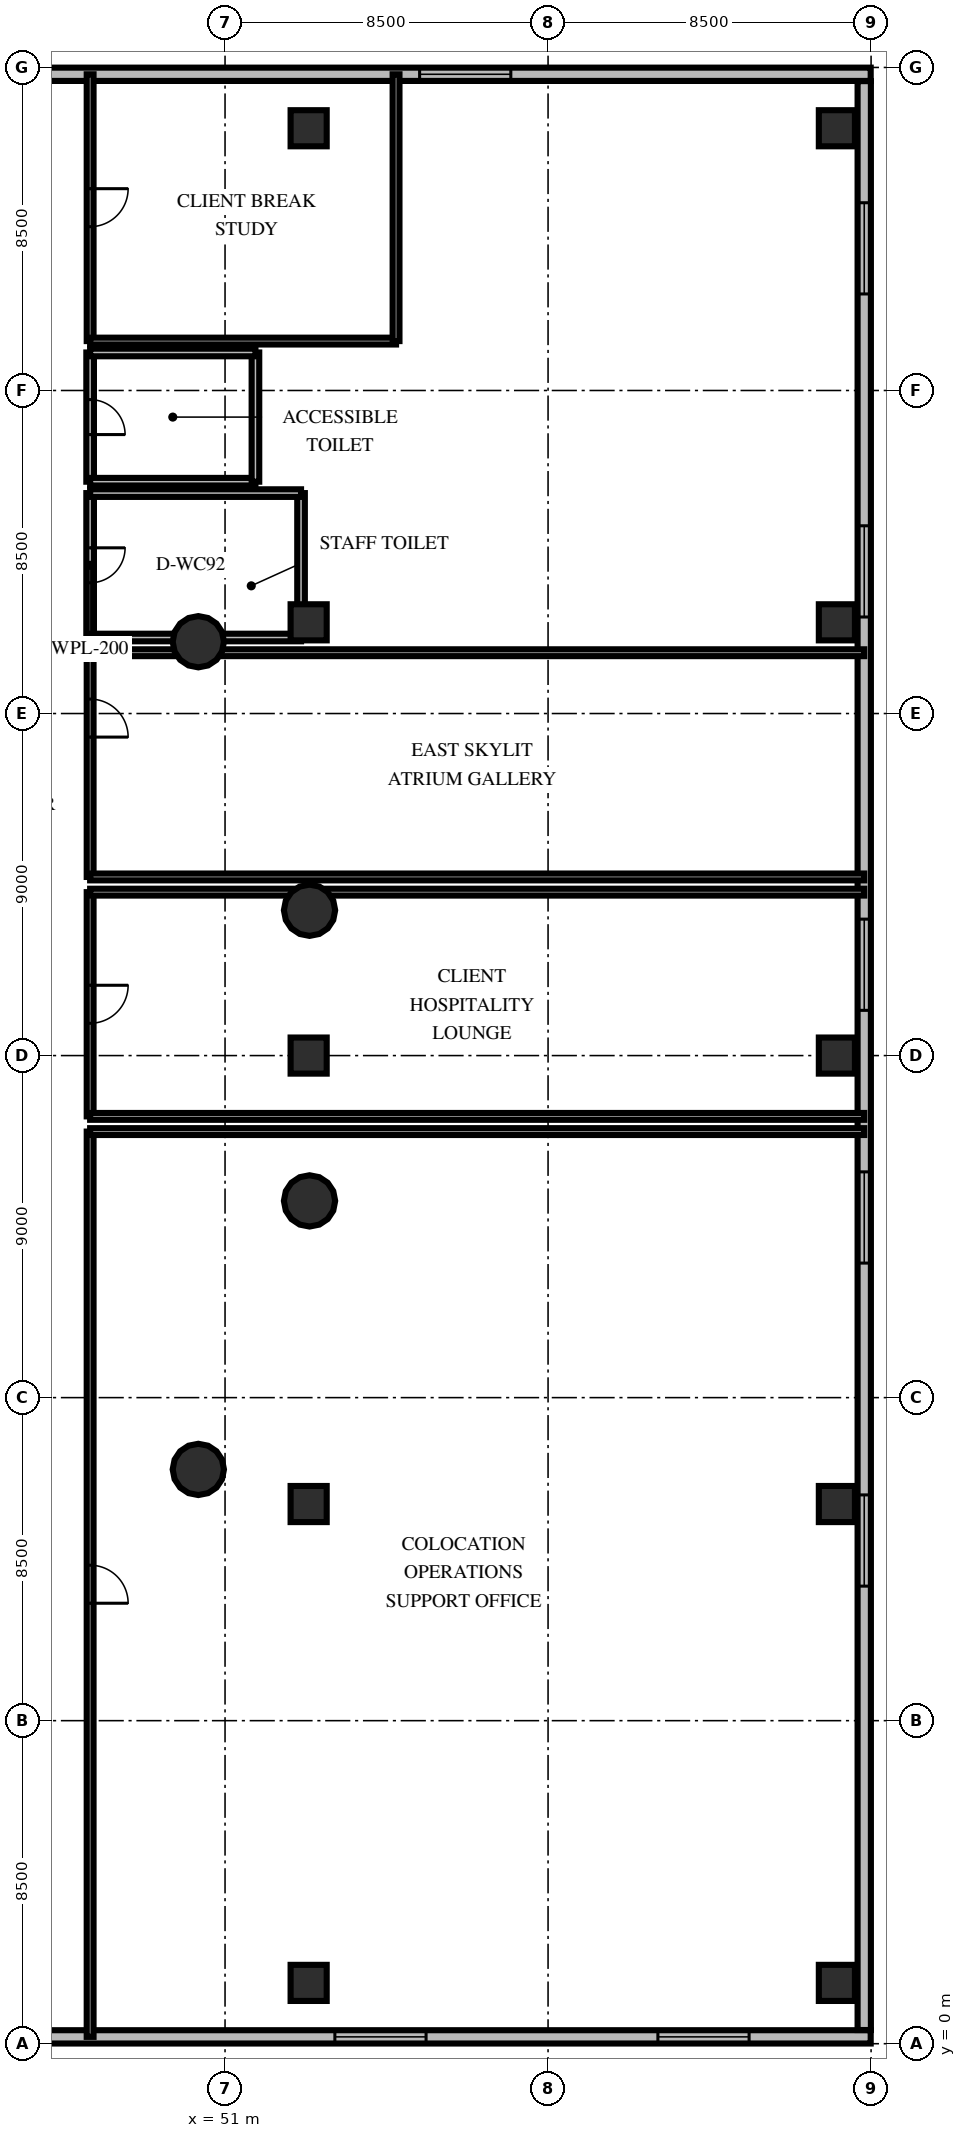
"""IFC4 building model, lengths in metres.
Left out: names, types, materials, properties, quantities, classifications, styles, units other than length and angle.
Written with IfcOpenShell. Run it as: python <this file> out.ifc"""

import sys

from ifc_helpers import new_model, si_unit, direction, frame, frame_2d, origin, origin_2d, place, context, subcontext, project, spatial, rectangle, circle, extrude, element, fill, save


model = new_model("IFC4")
c1 = context("Model", 3, precision=1e-05, world=origin(), true_north=direction((0.0, 1.0)))
c2 = subcontext(c1, "Body", "Model", "MODEL_VIEW")
j1 = project(units=[si_unit("LENGTHUNIT", "METRE"), si_unit("PLANEANGLEUNIT", "RADIAN")], contexts=[c1])
p1 = place(None, origin())
s1 = spatial("IfcSite", under=j1, at=p1, CompositionType="ELEMENT")
p2 = place(p1, origin())
s2 = spatial("IfcBuilding", under=s1, at=p2, CompositionType="ELEMENT")
p3 = place(p2, frame((0.0, 0.0, 25.2)))
s3 = spatial("IfcBuildingStorey", under=s2, at=p3, CompositionType="ELEMENT", Elevation=25.2)
for number, where, z_axis, x_axis in (
    (1, (53.2, 1.6, 0.0), (0.0, 0.0, 1.0), (1.0, 0.0, 0.0)),
    (2, (53.2, 14.2, 0.0), (0.0, 0.0, 1.0), (1.0, 0.0, 0.0)),
    (3, (53.2, 26.0, 0.0), (0.0, 0.0, 1.0), (1.0, 0.0, 0.0)),
    (4, (53.2, 37.4, 0.0), (0.0, 0.0, 1.0), (1.0, 0.0, 0.0)),
    (5, (53.2, 50.4, 0.0), (0.0, 0.0, 1.0), (1.0, 0.0, 0.0)),
    (6, (67.1, 1.6, 0.0), (0.0, 0.0, 1.0), (1.0, 0.0, 0.0)),
    (7, (67.1, 14.2, 0.0), (0.0, 0.0, 1.0), (1.0, 0.0, 0.0)),
    (8, (67.1, 26.0, 0.0), (0.0, 0.0, 1.0), (1.0, 0.0, 0.0)),
    (9, (67.1, 37.4, 0.0), (0.0, 0.0, 1.0), (1.0, 0.0, 0.0)),
    (10, (67.1, 50.4, 0.0), (0.0, 0.0, 1.0), (1.0, 0.0, 0.0)),
):
    element("IfcColumn", number, at=place(p3, frame(where, z_axis=z_axis, x_axis=x_axis)), inside=s3, PredefinedType="COLUMN", context=c2, shape_type="SweptSolid", body=[
        extrude(rectangle(XDim=0.95, YDim=0.95, at=origin_2d()), origin(), (0.0, 0.0, 1.0), 4.8),
    ])
for number, where, z_axis, x_axis in (
    (11, (53.223, 29.824, 0.0), (0.0, 0.0, 1.0), (1.0, 0.0, 0.0)),
    (12, (50.297, 36.889, 0.0), (0.0, 0.0, 1.0), (1.0, 0.0, 0.0)),
    (13, (50.297, 15.111, 0.0), (0.0, 0.0, 1.0), (1.0, 0.0, 0.0)),
    (14, (53.223, 22.176, 0.0), (0.0, 0.0, 1.0), (1.0, 0.0, 0.0)),
):
    element("IfcColumn", number, at=place(p3, frame(where, z_axis=z_axis, x_axis=x_axis)), inside=s3, PredefinedType="COLUMN", context=c2, shape_type="SweptSolid", body=[
        extrude(circle(Radius=0.675, at=origin_2d()), origin(), (0.0, 0.0, 1.0), 4.8),
    ])
p4 = place(p3, frame((67.99, 0.18, 0.0), z_axis=(0.0, 0.0, 1.0), x_axis=(-1.0, 0.0, 0.0)))
e15 = element("IfcWall", 15, at=p4, inside=s3, PredefinedType="SOLIDWALL", context=c2, shape_type="SweptSolid", body=[
    extrude(rectangle(XDim=25.42, YDim=0.35, at=frame_2d((12.71, 0.0))), origin(), (0.0, 0.0, 1.0), 3.8),
])
p5 = place(p4, frame((3.2, 0.0, 0.85)))
e16 = element("IfcOpeningElement", 16, at=p5, cuts=e15, PredefinedType="OPENING", context=c2, shape_type="SweptSolid", body=[
    extrude(rectangle(XDim=2.4, YDim=2.4, at=frame_2d((1.2, 1.2))), frame((0.0, 0.185, 0.0), z_axis=(0.0, -1.0, 0.0), x_axis=(1.0, 0.0, 0.0)), (0.0, 0.0, 1.0), 0.37),
])
p6 = place(p4, frame((11.7, 0.0, 0.85)))
e17 = element("IfcOpeningElement", 17, at=p6, cuts=e15, PredefinedType="OPENING", context=c2, shape_type="SweptSolid", body=[
    extrude(rectangle(XDim=2.4, YDim=2.4, at=frame_2d((1.2, 1.2))), frame((0.0, 0.185, 0.0), z_axis=(0.0, -1.0, 0.0), x_axis=(1.0, 0.0, 0.0)), (0.0, 0.0, 1.0), 0.37),
])
p7 = place(p3, frame((67.82, 51.64, 0.0), z_axis=(0.0, 0.0, 1.0), x_axis=(0.0, -1.0, 0.0)))
e18 = element("IfcWall", 18, at=p7, inside=s3, PredefinedType="SOLIDWALL", context=c2, shape_type="SweptSolid", body=[
    extrude(rectangle(XDim=51.28, YDim=0.35, at=frame_2d((25.64, 0.0))), origin(), (0.0, 0.0, 1.0), 3.8),
])
p8 = place(p7, frame((3.2, 0.0, 0.85)))
e19 = element("IfcOpeningElement", 19, at=p8, cuts=e18, PredefinedType="OPENING", context=c2, shape_type="SweptSolid", body=[
    extrude(rectangle(XDim=2.4, YDim=2.4, at=frame_2d((1.2, 1.2))), frame((0.0, 0.185, 0.0), z_axis=(0.0, -1.0, 0.0), x_axis=(1.0, 0.0, 0.0)), (0.0, 0.0, 1.0), 0.37),
])
p9 = place(p7, frame((11.7, 0.0, 0.85)))
e20 = element("IfcOpeningElement", 20, at=p9, cuts=e18, PredefinedType="OPENING", context=c2, shape_type="SweptSolid", body=[
    extrude(rectangle(XDim=2.4, YDim=2.4, at=frame_2d((1.2, 1.2))), frame((0.0, 0.185, 0.0), z_axis=(0.0, -1.0, 0.0), x_axis=(1.0, 0.0, 0.0)), (0.0, 0.0, 1.0), 0.37),
])
p10 = place(p7, frame((22.05, 0.0, 0.85)))
e21 = element("IfcOpeningElement", 21, at=p10, cuts=e18, PredefinedType="OPENING", context=c2, shape_type="SweptSolid", body=[
    extrude(rectangle(XDim=2.4, YDim=2.4, at=frame_2d((1.2, 1.2))), frame((0.0, 0.185, 0.0), z_axis=(0.0, -1.0, 0.0), x_axis=(1.0, 0.0, 0.0)), (0.0, 0.0, 1.0), 0.37),
])
p11 = place(p7, frame((28.7, 0.0, 0.85)))
e22 = element("IfcOpeningElement", 22, at=p11, cuts=e18, PredefinedType="OPENING", context=c2, shape_type="SweptSolid", body=[
    extrude(rectangle(XDim=2.4, YDim=2.4, at=frame_2d((1.2, 1.2))), frame((0.0, 0.185, 0.0), z_axis=(0.0, -1.0, 0.0), x_axis=(1.0, 0.0, 0.0)), (0.0, 0.0, 1.0), 0.37),
])
p12 = place(p7, frame((37.2, 0.0, 0.85)))
e23 = element("IfcOpeningElement", 23, at=p12, cuts=e18, PredefinedType="OPENING", context=c2, shape_type="SweptSolid", body=[
    extrude(rectangle(XDim=2.4, YDim=2.4, at=frame_2d((1.2, 1.2))), frame((0.0, 0.185, 0.0), z_axis=(0.0, -1.0, 0.0), x_axis=(1.0, 0.0, 0.0)), (0.0, 0.0, 1.0), 0.37),
])
p13 = place(p3, frame((42.57, 51.82, 0.0), z_axis=(0.0, 0.0, 1.0), x_axis=(1.0, 0.0, 0.0)))
e24 = element("IfcWall", 24, at=p13, inside=s3, PredefinedType="SOLIDWALL", context=c2, shape_type="SweptSolid", body=[
    extrude(rectangle(XDim=25.42, YDim=0.35, at=frame_2d((12.71, 0.0))), origin(), (0.0, 0.0, 1.0), 3.8),
])
p14 = place(p13, frame((13.55, 0.0, 0.85)))
e25 = element("IfcOpeningElement", 25, at=p14, cuts=e24, PredefinedType="OPENING", context=c2, shape_type="SweptSolid", body=[
    extrude(rectangle(XDim=2.4, YDim=2.4, at=frame_2d((1.2, 1.2))), frame((0.0, 0.185, 0.0), z_axis=(0.0, -1.0, 0.0), x_axis=(1.0, 0.0, 0.0)), (0.0, 0.0, 1.0), 0.37),
])
p15 = place(p3, frame((47.45, 24.0, 0.0), z_axis=(0.0, 0.0, 1.0), x_axis=(0.0, -1.0, 0.0)))
e26 = element("IfcWall", 26, at=p15, inside=s3, PredefinedType="PARTITIONING", context=c2, shape_type="SweptSolid", body=[
    extrude(rectangle(XDim=23.82, YDim=0.18, at=frame_2d((11.91, 0.0))), origin(), (0.0, 0.0, 1.0), 3.6),
])
p16 = place(p15, frame((11.41, 0.0, 0.0)))
e27 = element("IfcOpeningElement", 27, at=p16, cuts=e26, PredefinedType="OPENING", context=c2, shape_type="SweptSolid", body=[
    extrude(rectangle(XDim=1.0, YDim=2.15, at=frame_2d((0.5, 1.075))), frame((0.0, 0.1, 0.0), z_axis=(0.0, -1.0, 0.0), x_axis=(1.0, 0.0, 0.0)), (0.0, 0.0, 1.0), 0.2),
])
p17 = place(p3, frame((67.82, 24.0, 0.0), z_axis=(0.0, 0.0, 1.0), x_axis=(-1.0, 0.0, 0.0)))
e28 = element("IfcWall", 28, at=p17, inside=s3, PredefinedType="PARTITIONING", context=c2, shape_type="SweptSolid", body=[
    extrude(rectangle(XDim=20.37, YDim=0.18, at=frame_2d((10.185, 0.0))), origin(), (0.0, 0.0, 1.0), 3.6),
])
p18 = place(p3, frame((47.45, 30.3, 0.0), z_axis=(0.0, 0.0, 1.0), x_axis=(0.0, -1.0, 0.0)))
e29 = element("IfcWall", 29, at=p18, inside=s3, PredefinedType="PARTITIONING", context=c2, shape_type="SweptSolid", body=[
    extrude(rectangle(XDim=5.9, YDim=0.18, at=frame_2d((2.95, 0.0))), origin(), (0.0, 0.0, 1.0), 3.6),
])
p19 = place(p18, frame((2.45, 0.0, 0.0)))
e30 = element("IfcOpeningElement", 30, at=p19, cuts=e29, PredefinedType="OPENING", context=c2, shape_type="SweptSolid", body=[
    extrude(rectangle(XDim=1.0, YDim=2.15, at=frame_2d((0.5, 1.075))), frame((0.0, 0.1, 0.0), z_axis=(0.0, -1.0, 0.0), x_axis=(1.0, 0.0, 0.0)), (0.0, 0.0, 1.0), 0.2),
])
for number, where, z_axis, x_axis in (
    (31, (47.45, 24.4, 0.0), (0.0, 0.0, 1.0), (1.0, 0.0, 0.0)),
    (32, (67.82, 30.3, 0.0), (0.0, 0.0, 1.0), (-1.0, 0.0, 0.0)),
):
    element("IfcWall", number, at=place(p3, frame(where, z_axis=z_axis, x_axis=x_axis)), inside=s3, PredefinedType="PARTITIONING", context=c2, shape_type="SweptSolid", body=[
        extrude(rectangle(XDim=20.37, YDim=0.18, at=frame_2d((10.185, 0.0))), origin(), (0.0, 0.0, 1.0), 3.6),
    ])
p20 = place(p3, frame((47.45, 36.6, 0.0), z_axis=(0.0, 0.0, 1.0), x_axis=(0.0, -1.0, 0.0)))
e33 = element("IfcWall", 33, at=p20, inside=s3, PredefinedType="PARTITIONING", context=c2, shape_type="SweptSolid", body=[
    extrude(rectangle(XDim=5.9, YDim=0.18, at=frame_2d((2.95, 0.0))), origin(), (0.0, 0.0, 1.0), 3.6),
])
p21 = place(p20, frame((1.22, 0.0, 0.0)))
e34 = element("IfcOpeningElement", 34, at=p21, cuts=e33, PredefinedType="OPENING", context=c2, shape_type="SweptSolid", body=[
    extrude(rectangle(XDim=1.0, YDim=2.15, at=frame_2d((0.5, 1.075))), frame((0.0, 0.1, 0.0), z_axis=(0.0, -1.0, 0.0), x_axis=(1.0, 0.0, 0.0)), (0.0, 0.0, 1.0), 0.2),
])
for number, where, z_axis, x_axis in (
    (35, (47.45, 30.7, 0.0), (0.0, 0.0, 1.0), (1.0, 0.0, 0.0)),
    (36, (67.82, 36.6, 0.0), (0.0, 0.0, 1.0), (-1.0, 0.0, 0.0)),
):
    element("IfcWall", number, at=place(p3, frame(where, z_axis=z_axis, x_axis=x_axis)), inside=s3, PredefinedType="PARTITIONING", context=c2, shape_type="SweptSolid", body=[
        extrude(rectangle(XDim=20.37, YDim=0.18, at=frame_2d((10.185, 0.0))), origin(), (0.0, 0.0, 1.0), 3.6),
    ])
p22 = place(p3, frame((47.45, 40.8, 0.0), z_axis=(0.0, 0.0, 1.0), x_axis=(0.0, -1.0, 0.0)))
e37 = element("IfcWall", 37, at=p22, inside=s3, PredefinedType="PLUMBINGWALL", context=c2, shape_type="SweptSolid", body=[
    extrude(rectangle(XDim=3.8, YDim=0.2, at=frame_2d((1.9, 0.0))), origin(), (0.0, 0.0, 1.0), 3.6),
])
p23 = place(p22, frame((1.44, 0.0, 0.0)))
e38 = element("IfcOpeningElement", 38, at=p23, cuts=e37, PredefinedType="OPENING", context=c2, shape_type="SweptSolid", body=[
    extrude(rectangle(XDim=0.92, YDim=2.1, at=frame_2d((0.46, 1.05))), frame((0.0, 0.11, 0.0), z_axis=(0.0, -1.0, 0.0), x_axis=(1.0, 0.0, 0.0)), (0.0, 0.0, 1.0), 0.22),
])
p24 = place(p3, frame((47.45, 37.0, 0.0), z_axis=(0.0, 0.0, 1.0), x_axis=(1.0, 0.0, 0.0)))
e39 = element("IfcWall", 39, at=p24, inside=s3, PredefinedType="PLUMBINGWALL", context=c2, shape_type="SweptSolid", body=[
    extrude(rectangle(XDim=5.55, YDim=0.2, at=frame_2d((2.775, 0.0))), origin(), (0.0, 0.0, 1.0), 3.6),
])
p25 = place(p3, frame((53.0, 37.0, 0.0), z_axis=(0.0, 0.0, 1.0), x_axis=(0.0, 1.0, 0.0)))
e40 = element("IfcWall", 40, at=p25, inside=s3, PredefinedType="PLUMBINGWALL", context=c2, shape_type="SweptSolid", body=[
    extrude(rectangle(XDim=3.8, YDim=0.2, at=frame_2d((1.9, 0.0))), origin(), (0.0, 0.0, 1.0), 3.6),
])
p26 = place(p3, frame((53.0, 40.8, 0.0), z_axis=(0.0, 0.0, 1.0), x_axis=(-1.0, 0.0, 0.0)))
e41 = element("IfcWall", 41, at=p26, inside=s3, PredefinedType="PLUMBINGWALL", context=c2, shape_type="SweptSolid", body=[
    extrude(rectangle(XDim=5.55, YDim=0.2, at=frame_2d((2.775, 0.0))), origin(), (0.0, 0.0, 1.0), 3.6),
])
p27 = place(p3, frame((47.45, 44.5, 0.0), z_axis=(0.0, 0.0, 1.0), x_axis=(0.0, -1.0, 0.0)))
e42 = element("IfcWall", 42, at=p27, inside=s3, PredefinedType="PLUMBINGWALL", context=c2, shape_type="SweptSolid", body=[
    extrude(rectangle(XDim=3.4, YDim=0.2, at=frame_2d((1.7, 0.0))), origin(), (0.0, 0.0, 1.0), 3.6),
])
p28 = place(p27, frame((1.24, 0.0, 0.0)))
e43 = element("IfcOpeningElement", 43, at=p28, cuts=e42, PredefinedType="OPENING", context=c2, shape_type="SweptSolid", body=[
    extrude(rectangle(XDim=0.92, YDim=2.1, at=frame_2d((0.46, 1.05))), frame((0.0, 0.11, 0.0), z_axis=(0.0, -1.0, 0.0), x_axis=(1.0, 0.0, 0.0)), (0.0, 0.0, 1.0), 0.22),
])
p29 = place(p3, frame((47.45, 41.1, 0.0), z_axis=(0.0, 0.0, 1.0), x_axis=(1.0, 0.0, 0.0)))
e44 = element("IfcWall", 44, at=p29, inside=s3, PredefinedType="PLUMBINGWALL", context=c2, shape_type="SweptSolid", body=[
    extrude(rectangle(XDim=4.35, YDim=0.2, at=frame_2d((2.175, 0.0))), origin(), (0.0, 0.0, 1.0), 3.6),
])
p30 = place(p3, frame((51.8, 41.1, 0.0), z_axis=(0.0, 0.0, 1.0), x_axis=(0.0, 1.0, 0.0)))
e45 = element("IfcWall", 45, at=p30, inside=s3, PredefinedType="PLUMBINGWALL", context=c2, shape_type="SweptSolid", body=[
    extrude(rectangle(XDim=3.4, YDim=0.2, at=frame_2d((1.7, 0.0))), origin(), (0.0, 0.0, 1.0), 3.6),
])
p31 = place(p3, frame((51.8, 44.5, 0.0), z_axis=(0.0, 0.0, 1.0), x_axis=(-1.0, 0.0, 0.0)))
e46 = element("IfcWall", 46, at=p31, inside=s3, PredefinedType="PLUMBINGWALL", context=c2, shape_type="SweptSolid", body=[
    extrude(rectangle(XDim=4.35, YDim=0.2, at=frame_2d((2.175, 0.0))), origin(), (0.0, 0.0, 1.0), 3.6),
])
p32 = place(p3, frame((47.45, 51.82, 0.0), z_axis=(0.0, 0.0, 1.0), x_axis=(0.0, -1.0, 0.0)))
e47 = element("IfcWall", 47, at=p32, inside=s3, PredefinedType="PARTITIONING", context=c2, shape_type="SweptSolid", body=[
    extrude(rectangle(XDim=7.02, YDim=0.18, at=frame_2d((3.51, 0.0))), origin(), (0.0, 0.0, 1.0), 3.6),
])
p33 = place(p32, frame((3.01, 0.0, 0.0)))
e48 = element("IfcOpeningElement", 48, at=p33, cuts=e47, PredefinedType="OPENING", context=c2, shape_type="SweptSolid", body=[
    extrude(rectangle(XDim=1.0, YDim=2.15, at=frame_2d((0.5, 1.075))), frame((0.0, 0.1, 0.0), z_axis=(0.0, -1.0, 0.0), x_axis=(1.0, 0.0, 0.0)), (0.0, 0.0, 1.0), 0.2),
])
p34 = place(p3, frame((47.45, 44.8, 0.0), z_axis=(0.0, 0.0, 1.0), x_axis=(1.0, 0.0, 0.0)))
e49 = element("IfcWall", 49, at=p34, inside=s3, PredefinedType="PARTITIONING", context=c2, shape_type="SweptSolid", body=[
    extrude(rectangle(XDim=8.05, YDim=0.18, at=frame_2d((4.025, 0.0))), origin(), (0.0, 0.0, 1.0), 3.6),
])
p35 = place(p3, frame((55.5, 44.8, 0.0), z_axis=(0.0, 0.0, 1.0), x_axis=(0.0, 1.0, 0.0)))
e50 = element("IfcWall", 50, at=p35, inside=s3, PredefinedType="PARTITIONING", context=c2, shape_type="SweptSolid", body=[
    extrude(rectangle(XDim=7.02, YDim=0.18, at=frame_2d((3.51, 0.0))), origin(), (0.0, 0.0, 1.0), 3.6),
])
p36 = place(p5, origin())
e51 = element("IfcWindow", 51, at=p36, inside=s3, PartitioningType="SINGLE_PANEL", PredefinedType="WINDOW", context=c2, shape_type="SweptSolid", body=[
    extrude(rectangle(XDim=2.4, YDim=2.4, at=frame_2d((1.2, 1.2))), frame((0.0, 0.03, 0.0), z_axis=(0.0, -1.0, 0.0), x_axis=(1.0, 0.0, 0.0)), (0.0, 0.0, 1.0), 0.06),
])
fill(e16, e51)
p37 = place(p6, origin())
e52 = element("IfcWindow", 52, at=p37, inside=s3, PartitioningType="SINGLE_PANEL", PredefinedType="WINDOW", context=c2, shape_type="SweptSolid", body=[
    extrude(rectangle(XDim=2.4, YDim=2.4, at=frame_2d((1.2, 1.2))), frame((0.0, 0.03, 0.0), z_axis=(0.0, -1.0, 0.0), x_axis=(1.0, 0.0, 0.0)), (0.0, 0.0, 1.0), 0.06),
])
fill(e17, e52)
p38 = place(p8, origin())
e53 = element("IfcWindow", 53, at=p38, inside=s3, PartitioningType="SINGLE_PANEL", PredefinedType="WINDOW", context=c2, shape_type="SweptSolid", body=[
    extrude(rectangle(XDim=2.4, YDim=2.4, at=frame_2d((1.2, 1.2))), frame((0.0, 0.03, 0.0), z_axis=(0.0, -1.0, 0.0), x_axis=(1.0, 0.0, 0.0)), (0.0, 0.0, 1.0), 0.06),
])
fill(e19, e53)
p39 = place(p9, origin())
e54 = element("IfcWindow", 54, at=p39, inside=s3, PartitioningType="SINGLE_PANEL", PredefinedType="WINDOW", context=c2, shape_type="SweptSolid", body=[
    extrude(rectangle(XDim=2.4, YDim=2.4, at=frame_2d((1.2, 1.2))), frame((0.0, 0.03, 0.0), z_axis=(0.0, -1.0, 0.0), x_axis=(1.0, 0.0, 0.0)), (0.0, 0.0, 1.0), 0.06),
])
fill(e20, e54)
p40 = place(p10, origin())
e55 = element("IfcWindow", 55, at=p40, inside=s3, PartitioningType="SINGLE_PANEL", PredefinedType="WINDOW", context=c2, shape_type="SweptSolid", body=[
    extrude(rectangle(XDim=2.4, YDim=2.4, at=frame_2d((1.2, 1.2))), frame((0.0, 0.03, 0.0), z_axis=(0.0, -1.0, 0.0), x_axis=(1.0, 0.0, 0.0)), (0.0, 0.0, 1.0), 0.06),
])
fill(e21, e55)
p41 = place(p11, origin())
e56 = element("IfcWindow", 56, at=p41, inside=s3, PartitioningType="SINGLE_PANEL", PredefinedType="WINDOW", context=c2, shape_type="SweptSolid", body=[
    extrude(rectangle(XDim=2.4, YDim=2.4, at=frame_2d((1.2, 1.2))), frame((0.0, 0.03, 0.0), z_axis=(0.0, -1.0, 0.0), x_axis=(1.0, 0.0, 0.0)), (0.0, 0.0, 1.0), 0.06),
])
fill(e22, e56)
p42 = place(p12, origin())
e57 = element("IfcWindow", 57, at=p42, inside=s3, PartitioningType="SINGLE_PANEL", PredefinedType="WINDOW", context=c2, shape_type="SweptSolid", body=[
    extrude(rectangle(XDim=2.4, YDim=2.4, at=frame_2d((1.2, 1.2))), frame((0.0, 0.03, 0.0), z_axis=(0.0, -1.0, 0.0), x_axis=(1.0, 0.0, 0.0)), (0.0, 0.0, 1.0), 0.06),
])
fill(e23, e57)
p43 = place(p14, origin())
e58 = element("IfcWindow", 58, at=p43, inside=s3, PartitioningType="SINGLE_PANEL", PredefinedType="WINDOW", context=c2, shape_type="SweptSolid", body=[
    extrude(rectangle(XDim=2.4, YDim=2.4, at=frame_2d((1.2, 1.2))), frame((0.0, 0.03, 0.0), z_axis=(0.0, -1.0, 0.0), x_axis=(1.0, 0.0, 0.0)), (0.0, 0.0, 1.0), 0.06),
])
fill(e25, e58)
p44 = place(p16, origin())
e59 = element("IfcDoor", 59, at=p44, inside=s3, OperationType="SINGLE_SWING_RIGHT", PredefinedType="DOOR", context=c2, shape_type="SweptSolid", body=[
    extrude(rectangle(XDim=1.0, YDim=2.15, at=frame_2d((0.5, 1.075))), frame((0.0, 0.025, 0.0), z_axis=(0.0, -1.0, 0.0), x_axis=(1.0, 0.0, 0.0)), (0.0, 0.0, 1.0), 0.05),
])
fill(e27, e59)
p45 = place(p19, origin())
e60 = element("IfcDoor", 60, at=p45, inside=s3, OperationType="SINGLE_SWING_LEFT", PredefinedType="DOOR", context=c2, shape_type="SweptSolid", body=[
    extrude(rectangle(XDim=1.0, YDim=2.15, at=frame_2d((0.5, 1.075))), frame((0.0, 0.025, 0.0), z_axis=(0.0, -1.0, 0.0), x_axis=(1.0, 0.0, 0.0)), (0.0, 0.0, 1.0), 0.05),
])
fill(e30, e60)
p46 = place(p21, origin())
e61 = element("IfcDoor", 61, at=p46, inside=s3, OperationType="SINGLE_SWING_RIGHT", PredefinedType="DOOR", context=c2, shape_type="SweptSolid", body=[
    extrude(rectangle(XDim=1.0, YDim=2.15, at=frame_2d((0.5, 1.075))), frame((0.0, 0.025, 0.0), z_axis=(0.0, -1.0, 0.0), x_axis=(1.0, 0.0, 0.0)), (0.0, 0.0, 1.0), 0.05),
])
fill(e34, e61)
p47 = place(p23, origin())
e62 = element("IfcDoor", 62, at=p47, inside=s3, OperationType="SINGLE_SWING_LEFT", PredefinedType="DOOR", context=c2, shape_type="SweptSolid", body=[
    extrude(rectangle(XDim=0.92, YDim=2.1, at=frame_2d((0.46, 1.05))), frame((0.0, 0.025, 0.0), z_axis=(0.0, -1.0, 0.0), x_axis=(1.0, 0.0, 0.0)), (0.0, 0.0, 1.0), 0.05),
])
fill(e38, e62)
p48 = place(p28, origin())
e63 = element("IfcDoor", 63, at=p48, inside=s3, OperationType="SINGLE_SWING_RIGHT", PredefinedType="DOOR", context=c2, shape_type="SweptSolid", body=[
    extrude(rectangle(XDim=0.92, YDim=2.1, at=frame_2d((0.46, 1.05))), frame((0.0, 0.025, 0.0), z_axis=(0.0, -1.0, 0.0), x_axis=(1.0, 0.0, 0.0)), (0.0, 0.0, 1.0), 0.05),
])
fill(e43, e63)
p49 = place(p33, origin())
e64 = element("IfcDoor", 64, at=p49, inside=s3, OperationType="SINGLE_SWING_LEFT", PredefinedType="DOOR", context=c2, shape_type="SweptSolid", body=[
    extrude(rectangle(XDim=1.0, YDim=2.15, at=frame_2d((0.5, 1.075))), frame((0.0, 0.025, 0.0), z_axis=(0.0, -1.0, 0.0), x_axis=(1.0, 0.0, 0.0)), (0.0, 0.0, 1.0), 0.05),
])
fill(e48, e64)
save(model, sys.argv[1])
